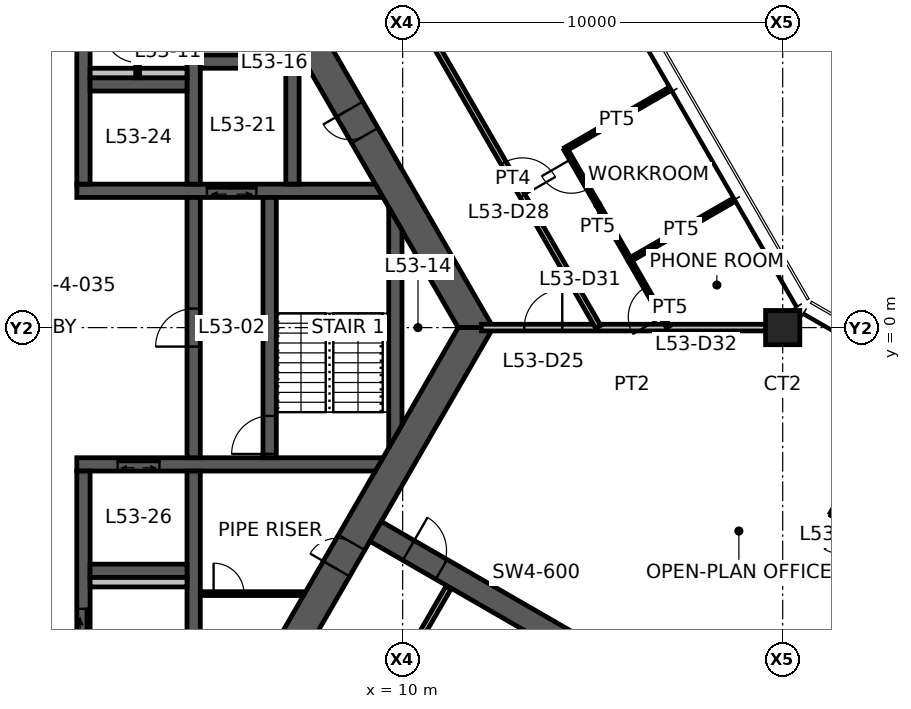
"""IFC4 building model, lengths in metres.
Left out: names, types, materials, properties, quantities, classifications, styles, units other than length and angle.
Written with IfcOpenShell. Run it as: python <this file> out.ifc"""

import sys

from ifc_helpers import new_model, si_unit, direction, frame, frame_2d, origin, origin_2d, place, context, subcontext, project, spatial, polyline, rectangle, hollow_rectangle, outline, extrude, element, fill, save


model = new_model("IFC4")
c1 = context("Model", 3, precision=1e-05, world=origin(), true_north=direction((0.0, 1.0)))
c2 = subcontext(c1, "Body", "Model", "MODEL_VIEW")
j1 = project(units=[si_unit("LENGTHUNIT", "METRE"), si_unit("PLANEANGLEUNIT", "RADIAN")], contexts=[c1])
p1 = place(None, origin())
s1 = spatial("IfcSite", under=j1, at=p1, CompositionType="ELEMENT")
p2 = place(p1, origin())
s2 = spatial("IfcBuilding", under=s1, at=p2, CompositionType="ELEMENT")
p3 = place(p2, frame((0.0, 0.0, 212.8)))
s3 = spatial("IfcBuildingStorey", under=s2, at=p3, CompositionType="ELEMENT", Elevation=212.8)
p4 = place(p3, frame((20.0, 0.0, 0.0), z_axis=(0.0, 0.0, 1.0), x_axis=(1.0, 0.0, 0.0)))
e1 = element("IfcColumn", 1, at=p4, inside=s3, PredefinedType="COLUMN", context=c2, shape_type="SweptSolid", body=[
    extrude(hollow_rectangle(XDim=0.9, YDim=0.9, WallThickness=0.09, at=origin_2d()), origin(), (0.0, 0.0, 1.0), 3.9),
])
p5 = place(p3, frame((11.922, 0.0, 0.0), z_axis=(0.0, 0.0, 1.0), x_axis=(-0.500004296715, 0.866022923061, 0.0)))
e2 = element("IfcWall", 2, at=p5, inside=s3, PredefinedType="SHEAR", context=c2, shape_type="SweptSolid", body=[
    extrude(outline(polyline([(-0.231, -0.4), (5.835, -0.4), (6.635, -0.4), (12.153, -0.4), (11.691, 0.4), (6.635, 0.4), (5.835, 0.4), (0.231, 0.4), (-0.231, -0.4)])), origin(), (0.0, 0.0, 1.0), 3.9),
])
p6 = place(p5, frame((5.835, 0.0, 0.0)))
e3 = element("IfcOpeningElement", 3, at=p6, cuts=e2, PredefinedType="OPENING", context=c2, shape_type="SweptSolid", body=[
    extrude(rectangle(XDim=0.8, YDim=2.1, at=frame_2d((0.4, 1.05))), frame((0.0, 0.41, 0.0), z_axis=(0.0, -1.0, 0.0), x_axis=(1.0, 0.0, 0.0)), (0.0, 0.0, 1.0), 0.82),
])
p7 = place(p3, frame((5.961, -10.325, 0.0), z_axis=(0.0, 0.0, 1.0), x_axis=(0.500004296715, 0.866022923061, 0.0)))
e4 = element("IfcWall", 4, at=p7, inside=s3, PredefinedType="SHEAR", context=c2, shape_type="SweptSolid", body=[
    extrude(outline(polyline([(-0.231, -0.4), (4.594, -0.4), (5.394, -0.4), (12.153, -0.4), (11.691, 0.4), (5.394, 0.4), (4.594, 0.4), (0.231, 0.4), (-0.231, -0.4)])), origin(), (0.0, 0.0, 1.0), 3.9),
])
p8 = place(p7, frame((4.594, 0.0, 0.0)))
e5 = element("IfcOpeningElement", 5, at=p8, cuts=e4, PredefinedType="OPENING", context=c2, shape_type="SweptSolid", body=[
    extrude(rectangle(XDim=0.8, YDim=2.1, at=frame_2d((0.4, 1.05))), frame((0.0, 0.41, 0.0), z_axis=(0.0, -1.0, 0.0), x_axis=(1.0, 0.0, 0.0)), (0.0, 0.0, 1.0), 0.82),
])
p9 = place(p3, frame((9.288, -5.363, 0.0), z_axis=(0.0, 0.0, 1.0), x_axis=(0.866031736626, -0.499989031036, 0.0)))
e6 = element("IfcWall", 6, at=p9, inside=s3, PredefinedType="SHEAR", context=c2, shape_type="SweptSolid", body=[
    extrude(rectangle(XDim=7.796, YDim=0.6, at=frame_2d((3.898, 0.0))), origin(), (0.0, 0.0, 1.0), 3.9),
])
p10 = place(p9, frame((1.0, 0.0, 0.0)))
e7 = element("IfcOpeningElement", 7, at=p10, cuts=e6, PredefinedType="OPENING", context=c2, shape_type="SweptSolid", body=[
    extrude(rectangle(XDim=1.0, YDim=2.1, at=frame_2d((0.5, 1.05))), frame((0.0, 0.31, 0.0), z_axis=(0.0, -1.0, 0.0), x_axis=(1.0, 0.0, 0.0)), (0.0, 0.0, 1.0), 0.62),
])
p11 = place(p3, frame((1.425, 3.6, 0.0), z_axis=(0.0, 0.0, 1.0), x_axis=(1.0, 0.0, 0.0)))
e8 = element("IfcWall", 8, at=p11, inside=s3, PredefinedType="SHEAR", context=c2, shape_type="SweptSolid", body=[
    extrude(outline(polyline([(0.0, -0.175), (3.425, -0.175), (4.725, -0.175), (8.058, -0.175), (7.856, 0.175), (4.725, 0.175), (3.425, 0.175), (0.0, 0.175), (0.0, -0.175)])), origin(), (0.0, 0.0, 1.0), 3.9),
])
p12 = place(p11, frame((3.425, 0.0, 0.0)))
e9 = element("IfcOpeningElement", 9, at=p12, cuts=e8, PredefinedType="OPENING", context=c2, shape_type="SweptSolid", body=[
    extrude(rectangle(XDim=1.3, YDim=2.1, at=frame_2d((0.65, 1.05))), frame((0.0, 0.185, 0.0), z_axis=(0.0, -1.0, 0.0), x_axis=(1.0, 0.0, 0.0)), (0.0, 0.0, 1.0), 0.37),
])
p13 = place(p3, frame((1.425, -3.6, 0.0), z_axis=(0.0, 0.0, 1.0), x_axis=(1.0, 0.0, 0.0)))
e10 = element("IfcWall", 10, at=p13, inside=s3, PredefinedType="SHEAR", context=c2, shape_type="SweptSolid", body=[
    extrude(outline(polyline([(0.0, -0.175), (1.075, -0.175), (2.175, -0.175), (7.856, -0.175), (8.058, 0.175), (2.175, 0.175), (1.075, 0.175), (0.0, 0.175), (0.0, -0.175)])), origin(), (0.0, 0.0, 1.0), 3.9),
])
p14 = place(p13, frame((1.075, 0.0, 0.0)))
e11 = element("IfcOpeningElement", 11, at=p14, cuts=e10, PredefinedType="OPENING", context=c2, shape_type="SweptSolid", body=[
    extrude(rectangle(XDim=1.1, YDim=2.1, at=frame_2d((0.55, 1.05))), frame((0.0, 0.185, 0.0), z_axis=(0.0, -1.0, 0.0), x_axis=(1.0, 0.0, 0.0)), (0.0, 0.0, 1.0), 0.37),
])
p15 = place(p3, frame((1.6, 3.775, 0.0), z_axis=(0.0, 0.0, 1.0), x_axis=(0.0, 1.0, 0.0)))
e12 = element("IfcWall", 12, at=p15, inside=s3, PredefinedType="SHEAR", context=c2, shape_type="SweptSolid", body=[
    extrude(rectangle(XDim=6.15, YDim=0.35, at=frame_2d((3.075, 0.0))), origin(), (0.0, 0.0, 1.0), 3.9),
])
p16 = place(p15, frame((3.775, 0.0, 0.0)))
e13 = element("IfcOpeningElement", 13, at=p16, cuts=e12, PredefinedType="OPENING", context=c2, shape_type="SweptSolid", body=[
    extrude(rectangle(XDim=0.9, YDim=2.1, at=frame_2d((0.45, 1.05))), frame((0.0, 0.185, 0.0), z_axis=(0.0, -1.0, 0.0), x_axis=(1.0, 0.0, 0.0)), (0.0, 0.0, 1.0), 0.37),
])
p17 = place(p3, frame((1.6, -3.775, 0.0), z_axis=(0.0, 0.0, 1.0), x_axis=(0.0, -1.0, 0.0)))
e14 = element("IfcWall", 14, at=p17, inside=s3, PredefinedType="SHEAR", context=c2, shape_type="SweptSolid", body=[
    extrude(rectangle(XDim=6.15, YDim=0.35, at=frame_2d((3.075, 0.0))), origin(), (0.0, 0.0, 1.0), 3.9),
])
p18 = place(p17, frame((3.625, 0.0, 0.0)))
e15 = element("IfcOpeningElement", 15, at=p18, cuts=e14, PredefinedType="OPENING", context=c2, shape_type="SweptSolid", body=[
    extrude(rectangle(XDim=1.2, YDim=2.1, at=frame_2d((0.6, 1.05))), frame((0.0, 0.185, 0.0), z_axis=(0.0, -1.0, 0.0), x_axis=(1.0, 0.0, 0.0)), (0.0, 0.0, 1.0), 0.37),
])
p19 = place(p3, frame((4.5, -3.425, 0.0), z_axis=(0.0, 0.0, 1.0), x_axis=(0.0, 1.0, 0.0)))
e16 = element("IfcWall", 16, at=p19, inside=s3, PredefinedType="SHEAR", context=c2, shape_type="SweptSolid", body=[
    extrude(rectangle(XDim=6.85, YDim=0.35, at=frame_2d((3.425, 0.0))), origin(), (0.0, 0.0, 1.0), 3.9),
])
p20 = place(p19, frame((2.925, 0.0, 0.0)))
e17 = element("IfcOpeningElement", 17, at=p20, cuts=e16, PredefinedType="OPENING", context=c2, shape_type="SweptSolid", body=[
    extrude(rectangle(XDim=1.0, YDim=2.1, at=frame_2d((0.5, 1.05))), frame((0.0, 0.185, 0.0), z_axis=(0.0, -1.0, 0.0), x_axis=(1.0, 0.0, 0.0)), (0.0, 0.0, 1.0), 0.37),
])
p21 = place(p3, frame((6.5, -3.425, 0.0), z_axis=(0.0, 0.0, 1.0), x_axis=(0.0, 1.0, 0.0)))
e18 = element("IfcWall", 18, at=p21, inside=s3, PredefinedType="SHEAR", context=c2, shape_type="SweptSolid", body=[
    extrude(rectangle(XDim=6.85, YDim=0.35, at=frame_2d((3.425, 0.0))), origin(), (0.0, 0.0, 1.0), 3.9),
])
p22 = place(p21, frame((0.1, 0.0, 0.0)))
e19 = element("IfcOpeningElement", 19, at=p22, cuts=e18, PredefinedType="OPENING", context=c2, shape_type="SweptSolid", body=[
    extrude(rectangle(XDim=1.0, YDim=2.1, at=frame_2d((0.5, 1.05))), frame((0.0, 0.185, 0.0), z_axis=(0.0, -1.0, 0.0), x_axis=(1.0, 0.0, 0.0)), (0.0, 0.0, 1.0), 0.37),
])
p23 = place(p3, frame((4.5, 3.775, 0.0), z_axis=(0.0, 0.0, 1.0), x_axis=(0.0, 1.0, 0.0)))
e20 = element("IfcWall", 20, at=p23, inside=s3, PredefinedType="SHEAR", context=c2, shape_type="SweptSolid", body=[
    extrude(rectangle(XDim=3.4, YDim=0.35, at=frame_2d((1.7, 0.0))), origin(), (0.0, 0.0, 1.0), 3.9),
])
p24 = place(p3, frame((4.5, -3.775, 0.0), z_axis=(0.0, 0.0, 1.0), x_axis=(0.0, -1.0, 0.0)))
e21 = element("IfcWall", 21, at=p24, inside=s3, PredefinedType="SHEAR", context=c2, shape_type="SweptSolid", body=[
    extrude(rectangle(XDim=6.15, YDim=0.35, at=frame_2d((3.075, 0.0))), origin(), (0.0, 0.0, 1.0), 3.9),
])
for number, where, z_axis, x_axis in (
    (22, (1.775, 6.4, 0.0), (0.0, 0.0, 1.0), (1.0, 0.0, 0.0)),
    (23, (1.775, -6.4, 0.0), (0.0, 0.0, 1.0), (1.0, 0.0, 0.0)),
):
    element("IfcWall", number, at=place(p3, frame(where, z_axis=z_axis, x_axis=x_axis)), inside=s3, PredefinedType="SHEAR", context=c2, shape_type="SweptSolid", body=[
        extrude(rectangle(XDim=2.55, YDim=0.35, at=frame_2d((1.275, 0.0))), origin(), (0.0, 0.0, 1.0), 3.9),
    ])
p25 = place(p3, frame((4.675, 7.0, 0.0), z_axis=(0.0, 0.0, 1.0), x_axis=(1.0, 0.0, 0.0)))
e24 = element("IfcWall", 24, at=p25, inside=s3, PredefinedType="SHEAR", context=c2, shape_type="SweptSolid", body=[
    extrude(rectangle(XDim=2.6, YDim=0.35, at=frame_2d((1.3, 0.0))), origin(), (0.0, 0.0, 1.0), 3.9),
])
p26 = place(p3, frame((7.1, 3.775, 0.0), z_axis=(0.0, 0.0, 1.0), x_axis=(0.0, 1.0, 0.0)))
e25 = element("IfcWall", 25, at=p26, inside=s3, PredefinedType="SHEAR", context=c2, shape_type="SweptSolid", body=[
    extrude(rectangle(XDim=3.05, YDim=0.35, at=frame_2d((1.525, 0.0))), origin(), (0.0, 0.0, 1.0), 3.9),
])
p27 = place(p3, frame((9.808, -2.862, 0.0), z_axis=(0.0, 0.0, 1.0), x_axis=(0.0, 1.0, 0.0)))
e26 = element("IfcWall", 26, at=p27, inside=s3, PredefinedType="SHEAR", context=c2, shape_type="SweptSolid", body=[
    extrude(outline(polyline([(0.303, -0.175), (5.421, -0.175), (6.028, 0.175), (-0.303, 0.175), (0.303, -0.175)])), origin(), (0.0, 0.0, 1.0), 3.9),
])
p28 = place(p3, frame((4.5, 7.175, 0.0), z_axis=(0.0, 0.0, 1.0), x_axis=(0.0, 1.0, 0.0)))
e27 = element("IfcWall", 27, at=p28, inside=s3, PredefinedType="STANDARD", context=c2, shape_type="SweptSolid", body=[
    extrude(rectangle(XDim=2.75, YDim=0.2, at=frame_2d((1.375, 0.0))), origin(), (0.0, 0.0, 1.0), 3.9),
])
for number, where, z_axis, x_axis in (
    (28, (1.775, 6.7, 0.0), (0.0, 0.0, 1.0), (1.0, 0.0, 0.0)),
    (29, (1.775, -6.7, 0.0), (0.0, 0.0, 1.0), (1.0, 0.0, 0.0)),
):
    element("IfcWall", number, at=place(p3, frame(where, z_axis=z_axis, x_axis=x_axis)), inside=s3, PredefinedType="PLUMBINGWALL", context=c2, shape_type="SweptSolid", body=[
        extrude(rectangle(XDim=2.55, YDim=0.25, at=frame_2d((1.275, 0.0))), origin(), (0.0, 0.0, 1.0), 3.9),
    ])
p29 = place(p3, frame((3.025, 6.575, 0.0), z_axis=(0.0, 0.0, 1.0), x_axis=(0.0, 1.0, 0.0)))
e30 = element("IfcWall", 30, at=p29, inside=s3, PredefinedType="PARTITIONING", context=c2, shape_type="SweptSolid", body=[
    extrude(rectangle(XDim=3.35, YDim=0.1, at=frame_2d((1.675, 0.0))), origin(), (0.0, 0.0, 1.0), 2.95),
])
p30 = place(p29, frame((2.0, 0.0, 0.0)))
e31 = element("IfcOpeningElement", 31, at=p30, cuts=e30, PredefinedType="OPENING", context=c2, shape_type="SweptSolid", body=[
    extrude(rectangle(XDim=0.9, YDim=2.1, at=frame_2d((0.45, 1.05))), frame((0.0, 0.06, 0.0), z_axis=(0.0, -1.0, 0.0), x_axis=(1.0, 0.0, 0.0)), (0.0, 0.0, 1.0), 0.12),
])
p31 = place(p29, frame((0.4, 0.0, 0.0)))
e32 = element("IfcOpeningElement", 32, at=p31, cuts=e30, PredefinedType="OPENING", context=c2, shape_type="SweptSolid", body=[
    extrude(rectangle(XDim=0.9, YDim=2.1, at=frame_2d((0.45, 1.05))), frame((0.0, 0.06, 0.0), z_axis=(0.0, -1.0, 0.0), x_axis=(1.0, 0.0, 0.0)), (0.0, 0.0, 1.0), 0.12),
])
p32 = place(p3, frame((4.675, -7.0, 0.0), z_axis=(0.0, 0.0, 1.0), x_axis=(1.0, 0.0, 0.0)))
e33 = element("IfcWall", 33, at=p32, inside=s3, PredefinedType="PARTITIONING", context=c2, shape_type="SweptSolid", body=[
    extrude(outline(polyline([(0.0, -0.05), (0.35, -0.05), (1.15, -0.05), (2.715, -0.05), (2.744, 0.0), (2.75, 0.05), (1.15, 0.05), (0.35, 0.05), (0.0, 0.05), (0.0, -0.05)])), origin(), (0.0, 0.0, 1.0), 2.95),
])
p33 = place(p32, frame((0.35, 0.0, 0.0)))
e34 = element("IfcOpeningElement", 34, at=p33, cuts=e33, PredefinedType="OPENING", context=c2, shape_type="SweptSolid", body=[
    extrude(rectangle(XDim=0.8, YDim=2.1, at=frame_2d((0.4, 1.05))), frame((0.0, 0.06, 0.0), z_axis=(0.0, -1.0, 0.0), x_axis=(1.0, 0.0, 0.0)), (0.0, 0.0, 1.0), 0.12),
])
p34 = place(p3, frame((12.07, 0.0, 0.0), z_axis=(0.0, 0.0, 1.0), x_axis=(1.0, 0.0, 0.0)))
e35 = element("IfcWall", 35, at=p34, inside=s3, PredefinedType="PARTITIONING", context=c2, shape_type="SweptSolid", body=[
    extrude(rectangle(XDim=7.93, YDim=0.175, at=frame_2d((3.965, 0.0))), origin(), (0.0, 0.0, 1.0), 3.05),
])
p35 = place(p34, frame((1.13, 0.0, 0.0)))
e36 = element("IfcOpeningElement", 36, at=p35, cuts=e35, PredefinedType="OPENING", context=c2, shape_type="SweptSolid", body=[
    extrude(rectangle(XDim=1.0, YDim=2.1, at=frame_2d((0.5, 1.05))), frame((0.0, 0.098, 0.0), z_axis=(0.0, -1.0, 0.0), x_axis=(1.0, 0.0, 0.0)), (0.0, 0.0, 1.0), 0.195),
])
p36 = place(p3, frame((10.664, 7.779, 0.0), z_axis=(0.0, 0.0, 1.0), x_axis=(0.49999608499, -0.866027664105, 0.0)))
e37 = element("IfcWall", 37, at=p36, inside=s3, PredefinedType="PARTITIONING", context=c2, shape_type="SweptSolid", body=[
    extrude(rectangle(XDim=8.959, YDim=0.15, at=frame_2d((4.479, 0.0))), origin(), (0.0, 0.0, 1.0), 2.95),
])
p37 = place(p36, frame((3.979, 0.0, 0.0)))
e38 = element("IfcOpeningElement", 38, at=p37, cuts=e37, PredefinedType="OPENING", context=c2, shape_type="SweptSolid", body=[
    extrude(rectangle(XDim=1.0, YDim=2.1, at=frame_2d((0.5, 1.05))), frame((0.0, 0.085, 0.0), z_axis=(0.0, -1.0, 0.0), x_axis=(1.0, 0.0, 0.0)), (0.0, 0.0, 1.0), 0.17),
])
p38 = place(p3, frame((18.683, 3.339, 0.0), z_axis=(0.0, 0.0, 1.0), x_axis=(-0.866847293351, -0.49857373578, 0.0)))
e39 = element("IfcWall", 39, at=p38, inside=s3, PredefinedType="PARTITIONING", context=c2, shape_type="SweptSolid", body=[
    extrude(rectangle(XDim=3.129, YDim=0.1, at=frame_2d((1.564, 0.0))), origin(), (0.0, 0.0, 1.0), 2.95),
])
p39 = place(p3, frame((14.287, 4.695, 0.0), z_axis=(0.0, 0.0, 1.0), x_axis=(0.866036558865, 0.499980678337, 0.0)))
e40 = element("IfcWall", 40, at=p39, inside=s3, PredefinedType="PARTITIONING", context=c2, shape_type="SweptSolid", body=[
    extrude(rectangle(XDim=3.11, YDim=0.1, at=frame_2d((1.555, 0.0))), origin(), (0.0, 0.0, 1.0), 2.95),
])
p40 = place(p3, frame((15.977, 1.777, 0.0), z_axis=(0.0, 0.0, 1.0), x_axis=(-0.501136151853, 0.865368451763, 0.0)))
e41 = element("IfcWall", 41, at=p40, inside=s3, PredefinedType="PARTITIONING", context=c2, shape_type="SweptSolid", body=[
    extrude(rectangle(XDim=3.372, YDim=0.1, at=frame_2d((1.686, 0.0))), origin(), (0.0, 0.0, 1.0), 2.95),
])
p41 = place(p40, frame((2.172, 0.0, 0.0)))
e42 = element("IfcOpeningElement", 42, at=p41, cuts=e41, PredefinedType="OPENING", context=c2, shape_type="SweptSolid", body=[
    extrude(rectangle(XDim=0.9, YDim=2.1, at=frame_2d((0.45, 1.05))), frame((0.0, 0.06, 0.0), z_axis=(0.0, -1.0, 0.0), x_axis=(1.0, 0.0, 0.0)), (0.0, 0.0, 1.0), 0.12),
])
p42 = place(p3, frame((16.986, 0.02, 0.0), z_axis=(0.0, 0.0, 1.0), x_axis=(-0.497993381906, 0.867180829803, 0.0)))
e43 = element("IfcWall", 43, at=p42, inside=s3, PredefinedType="PARTITIONING", context=c2, shape_type="SweptSolid", body=[
    extrude(rectangle(XDim=2.026, YDim=0.1, at=frame_2d((1.013, 0.0))), origin(), (0.0, 0.0, 1.0), 2.95),
])
p43 = place(p42, frame((0.3, 0.0, 0.0)))
e44 = element("IfcOpeningElement", 44, at=p43, cuts=e43, PredefinedType="OPENING", context=c2, shape_type="SweptSolid", body=[
    extrude(rectangle(XDim=0.9, YDim=2.1, at=frame_2d((0.45, 1.05))), frame((0.0, 0.06, 0.0), z_axis=(0.0, -1.0, 0.0), x_axis=(1.0, 0.0, 0.0)), (0.0, 0.0, 1.0), 0.12),
])
p44 = place(p3, frame((21.292, -4.903, 0.0), z_axis=(0.0, 0.0, 1.0), x_axis=(0.500000428765, 0.866025156237, 0.0)))
e45 = element("IfcWall", 45, at=p44, inside=s3, PredefinedType="PARTITIONING", context=c2, shape_type="SweptSolid", body=[
    extrude(rectangle(XDim=4.08, YDim=0.1, at=frame_2d((2.04, 0.0))), origin(), (0.0, 0.0, 1.0), 2.95),
])
p45 = place(p3, frame((27.025, -8.213, 0.0), z_axis=(0.0, 0.0, 1.0), x_axis=(-0.866021597574, 0.500006592492, 0.0)))
e46 = element("IfcWall", 46, at=p45, inside=s3, PredefinedType="PARTITIONING", context=c2, shape_type="SweptSolid", body=[
    extrude(rectangle(XDim=6.62, YDim=0.1, at=frame_2d((3.31, 0.0))), origin(), (0.0, 0.0, 1.0), 2.95),
])
p46 = place(p45, frame((5.42, 0.0, 0.0)))
e47 = element("IfcOpeningElement", 47, at=p46, cuts=e46, PredefinedType="OPENING", context=c2, shape_type="SweptSolid", body=[
    extrude(rectangle(XDim=0.9, YDim=2.1, at=frame_2d((0.45, 1.05))), frame((0.0, 0.06, 0.0), z_axis=(0.0, -1.0, 0.0), x_axis=(1.0, 0.0, 0.0)), (0.0, 0.0, 1.0), 0.12),
])
p47 = place(p3, frame((11.207, -6.84, 0.0), z_axis=(0.0, 0.0, 1.0), x_axis=(-0.500002959843, -0.866023694911, 0.0)))
e48 = element("IfcWall", 48, at=p47, inside=s3, PredefinedType="PARTITIONING", context=c2, shape_type="SweptSolid", body=[
    extrude(rectangle(XDim=7.258, YDim=0.15, at=frame_2d((3.629, 0.0))), origin(), (0.0, 0.0, 1.0), 2.95),
])
p48 = place(p6, origin())
e49 = element("IfcDoor", 49, at=p48, inside=s3, OperationType="SINGLE_SWING_RIGHT", PredefinedType="DOOR", context=c2, shape_type="SweptSolid", body=[
    extrude(rectangle(XDim=0.8, YDim=2.1, at=frame_2d((0.4, 1.05))), frame((0.0, 0.025, 0.0), z_axis=(0.0, -1.0, 0.0), x_axis=(1.0, 0.0, 0.0)), (0.0, 0.0, 1.0), 0.05),
])
fill(e3, e49)
p49 = place(p8, origin())
e50 = element("IfcDoor", 50, at=p49, inside=s3, OperationType="SINGLE_SWING_LEFT", PredefinedType="DOOR", context=c2, shape_type="SweptSolid", body=[
    extrude(rectangle(XDim=0.8, YDim=2.1, at=frame_2d((0.4, 1.05))), frame((0.0, 0.025, 0.0), z_axis=(0.0, -1.0, 0.0), x_axis=(1.0, 0.0, 0.0)), (0.0, 0.0, 1.0), 0.05),
])
fill(e5, e50)
p50 = place(p20, origin())
e51 = element("IfcDoor", 51, at=p50, inside=s3, OperationType="SINGLE_SWING_LEFT", PredefinedType="DOOR", context=c2, shape_type="SweptSolid", body=[
    extrude(rectangle(XDim=1.0, YDim=2.1, at=frame_2d((0.5, 1.05))), frame((0.0, 0.025, 0.0), z_axis=(0.0, -1.0, 0.0), x_axis=(1.0, 0.0, 0.0)), (0.0, 0.0, 1.0), 0.05),
])
fill(e17, e51)
p51 = place(p22, origin())
e52 = element("IfcDoor", 52, at=p51, inside=s3, OperationType="SINGLE_SWING_LEFT", PredefinedType="DOOR", context=c2, shape_type="SweptSolid", body=[
    extrude(rectangle(XDim=1.0, YDim=2.1, at=frame_2d((0.5, 1.05))), frame((0.0, 0.025, 0.0), z_axis=(0.0, -1.0, 0.0), x_axis=(1.0, 0.0, 0.0)), (0.0, 0.0, 1.0), 0.05),
])
fill(e19, e52)
p52 = place(p18, origin())
e53 = element("IfcDoor", 53, at=p52, inside=s3, OperationType="SLIDING_TO_LEFT", PredefinedType="DOOR", context=c2, shape_type="SweptSolid", body=[
    extrude(rectangle(XDim=1.2, YDim=2.1, at=frame_2d((0.6, 1.05))), frame((0.0, 0.025, 0.0), z_axis=(0.0, -1.0, 0.0), x_axis=(1.0, 0.0, 0.0)), (0.0, 0.0, 1.0), 0.05),
])
fill(e15, e53)
p53 = place(p10, origin())
e54 = element("IfcDoor", 54, at=p53, inside=s3, OperationType="SINGLE_SWING_LEFT", PredefinedType="DOOR", context=c2, shape_type="SweptSolid", body=[
    extrude(rectangle(XDim=1.0, YDim=2.1, at=frame_2d((0.5, 1.05))), frame((0.0, 0.025, 0.0), z_axis=(0.0, -1.0, 0.0), x_axis=(1.0, 0.0, 0.0)), (0.0, 0.0, 1.0), 0.05),
])
fill(e7, e54)
p54 = place(p31, origin())
e55 = element("IfcDoor", 55, at=p54, inside=s3, OperationType="SINGLE_SWING_RIGHT", PredefinedType="DOOR", context=c2, shape_type="SweptSolid", body=[
    extrude(rectangle(XDim=0.9, YDim=2.1, at=frame_2d((0.45, 1.05))), frame((0.0, 0.025, 0.0), z_axis=(0.0, -1.0, 0.0), x_axis=(1.0, 0.0, 0.0)), (0.0, 0.0, 1.0), 0.05),
])
fill(e32, e55)
p55 = place(p33, origin())
e56 = element("IfcDoor", 56, at=p55, inside=s3, OperationType="SINGLE_SWING_LEFT", PredefinedType="DOOR", context=c2, shape_type="SweptSolid", body=[
    extrude(rectangle(XDim=0.8, YDim=2.1, at=frame_2d((0.4, 1.05))), frame((0.0, 0.025, 0.0), z_axis=(0.0, -1.0, 0.0), x_axis=(1.0, 0.0, 0.0)), (0.0, 0.0, 1.0), 0.05),
])
fill(e34, e56)
p56 = place(p35, origin())
e57 = element("IfcDoor", 57, at=p56, inside=s3, OperationType="SINGLE_SWING_RIGHT", PredefinedType="DOOR", context=c2, shape_type="SweptSolid", body=[
    extrude(rectangle(XDim=1.0, YDim=2.1, at=frame_2d((0.5, 1.05))), frame((0.0, 0.025, 0.0), z_axis=(0.0, -1.0, 0.0), x_axis=(1.0, 0.0, 0.0)), (0.0, 0.0, 1.0), 0.05),
])
fill(e36, e57)
p57 = place(p37, origin())
e58 = element("IfcDoor", 58, at=p57, inside=s3, OperationType="SINGLE_SWING_RIGHT", PredefinedType="DOOR", context=c2, shape_type="SweptSolid", body=[
    extrude(rectangle(XDim=1.0, YDim=2.1, at=frame_2d((0.5, 1.05))), frame((0.0, 0.025, 0.0), z_axis=(0.0, -1.0, 0.0), x_axis=(1.0, 0.0, 0.0)), (0.0, 0.0, 1.0), 0.05),
])
fill(e38, e58)
p58 = place(p41, origin())
e59 = element("IfcDoor", 59, at=p58, inside=s3, OperationType="SINGLE_SWING_RIGHT", PredefinedType="DOOR", context=c2, shape_type="SweptSolid", body=[
    extrude(rectangle(XDim=0.9, YDim=2.1, at=frame_2d((0.45, 1.05))), frame((0.0, 0.025, 0.0), z_axis=(0.0, -1.0, 0.0), x_axis=(1.0, 0.0, 0.0)), (0.0, 0.0, 1.0), 0.05),
])
fill(e42, e59)
p59 = place(p43, origin())
e60 = element("IfcDoor", 60, at=p59, inside=s3, OperationType="SINGLE_SWING_LEFT", PredefinedType="DOOR", context=c2, shape_type="SweptSolid", body=[
    extrude(rectangle(XDim=0.9, YDim=2.1, at=frame_2d((0.45, 1.05))), frame((0.0, 0.025, 0.0), z_axis=(0.0, -1.0, 0.0), x_axis=(1.0, 0.0, 0.0)), (0.0, 0.0, 1.0), 0.05),
])
fill(e44, e60)
p60 = place(p14, origin())
e61 = element("IfcDoor", 61, at=p60, inside=s3, OperationType="DOUBLE_DOOR_SLIDING", PredefinedType="DOOR", context=c2, shape_type="SweptSolid", body=[
    extrude(rectangle(XDim=1.1, YDim=2.1, at=frame_2d((0.55, 1.05))), frame((0.0, 0.025, 0.0), z_axis=(0.0, -1.0, 0.0), x_axis=(1.0, 0.0, 0.0)), (0.0, 0.0, 1.0), 0.05),
])
fill(e11, e61)
p61 = place(p12, origin())
e62 = element("IfcDoor", 62, at=p61, inside=s3, OperationType="DOUBLE_DOOR_SLIDING", PredefinedType="DOOR", context=c2, shape_type="SweptSolid", body=[
    extrude(rectangle(XDim=1.3, YDim=2.1, at=frame_2d((0.65, 1.05))), frame((0.0, 0.025, 0.0), z_axis=(0.0, -1.0, 0.0), x_axis=(1.0, 0.0, 0.0)), (0.0, 0.0, 1.0), 0.05),
])
fill(e9, e62)
save(model, sys.argv[1])
